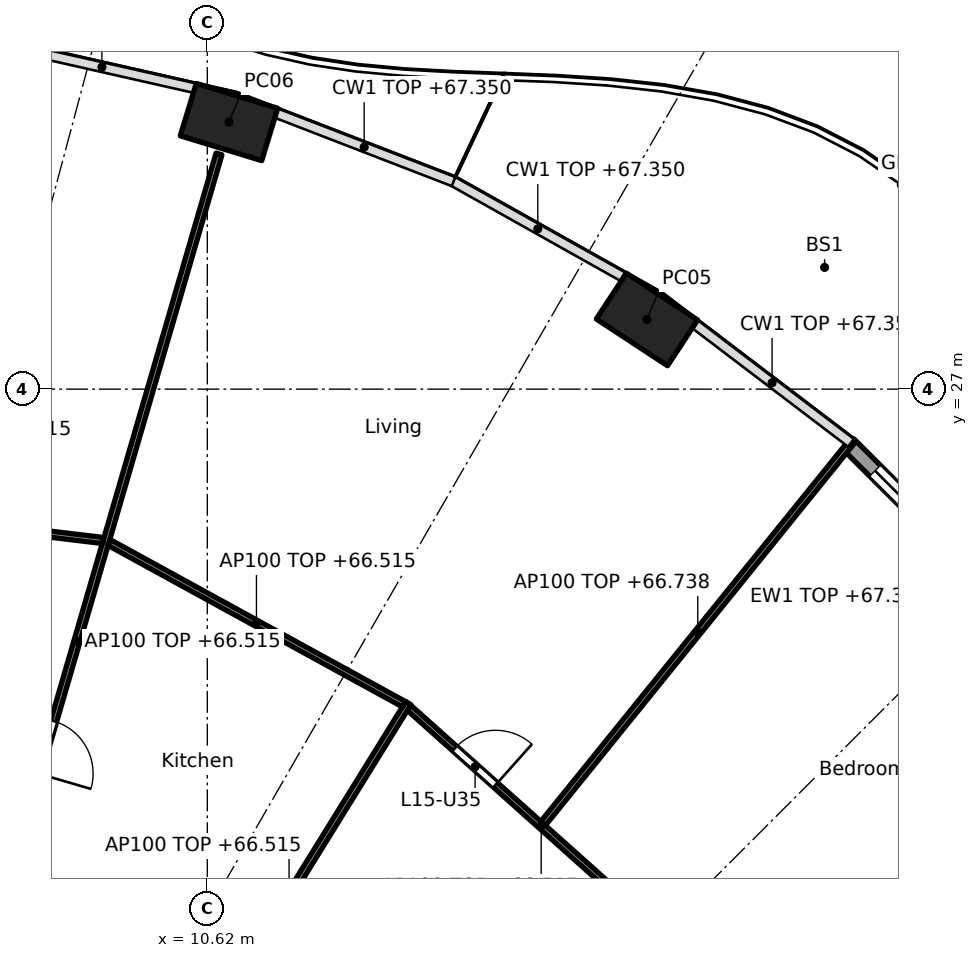
"""IFC4 building model, lengths in metres.
Left out: names, types, materials, properties, quantities, classifications, styles, units other than length and angle.
Written with IfcOpenShell. Run it as: python <this file> out.ifc"""

import sys

from ifc_helpers import new_model, si_unit, direction, frame, frame_2d, origin, origin_2d, place, context, subcontext, project, spatial, rectangle, hollow_rectangle, extrude, element, fill, save


model = new_model("IFC4")
c1 = context("Model", 3, precision=1e-05, world=origin(), true_north=direction((0.0, 1.0)))
c2 = subcontext(c1, "Body", "Model", "MODEL_VIEW")
j1 = project(units=[si_unit("LENGTHUNIT", "METRE"), si_unit("PLANEANGLEUNIT", "RADIAN")], contexts=[c1])
p1 = place(None, origin())
s1 = spatial("IfcSite", under=j1, at=p1, CompositionType="ELEMENT")
p2 = place(p1, origin())
s2 = spatial("IfcBuilding", under=s1, at=p2, CompositionType="ELEMENT")
p3 = place(p2, frame((0.0, 0.0, 64.0)))
s3 = spatial("IfcBuildingStorey", under=s2, at=p3, CompositionType="ELEMENT", Elevation=64.0)
for number, where, z_axis, x_axis in (
    (1, (17.85, 28.146, 0.0), (0.0, 0.0, 1.0), (-0.836, 0.549, 0.0)),
    (2, (10.976, 31.393, 0.0), (0.0, 0.0, 1.0), (-0.957, 0.292, 0.0)),
):
    element("IfcColumn", number, at=place(p3, frame(where, z_axis=z_axis, x_axis=x_axis)), inside=s3, PredefinedType="COLUMN", context=c2, shape_type="SweptSolid", body=[
        extrude(hollow_rectangle(XDim=1.4, YDim=0.9, WallThickness=0.05, at=origin_2d()), origin(), (0.0, 0.0, 1.0), 3.7),
    ])
p4 = place(p3, frame((21.166, 26.092, 0.0), z_axis=(0.0, 0.0, 1.0), x_axis=(0.707803094595, -0.706409781417, 0.0)))
e3 = element("IfcWall", 3, at=p4, inside=s3, PredefinedType="SOLIDWALL", context=c2, shape_type="SweptSolid", body=[
    extrude(rectangle(XDim=3.329, YDim=0.25, at=frame_2d((1.665, 0.0))), origin(), (0.0, 0.0, 1.0), 3.35),
])
p5 = place(p4, frame((0.615, 0.0, 0.0)))
e4 = element("IfcOpeningElement", 4, at=p5, cuts=e3, PredefinedType="OPENING", context=c2, shape_type="SweptSolid", body=[
    extrude(rectangle(XDim=2.1, YDim=2.4, at=frame_2d((1.05, 1.2))), frame((0.0, 0.135, 0.0), z_axis=(0.0, -1.0, 0.0), x_axis=(1.0, 0.0, 0.0)), (0.0, 0.0, 1.0), 0.27),
])
p6 = place(p3, frame((14.329, 11.221, 0.0), z_axis=(0.0, 0.0, 1.0), x_axis=(0.810671130917, 0.58550176558, 0.0)))
e5 = element("IfcWall", 5, at=p6, inside=s3, PredefinedType="PARTITIONING", context=c2, shape_type="SweptSolid", body=[
    extrude(rectangle(XDim=15.106, YDim=0.1, at=frame_2d((7.553, 0.0))), origin(), (0.0, 0.0, 1.0), 2.738),
])
p7 = place(p6, frame((3.105, 0.0, 0.0)))
e6 = element("IfcOpeningElement", 6, at=p7, cuts=e5, PredefinedType="OPENING", context=c2, shape_type="SweptSolid", body=[
    extrude(rectangle(XDim=0.9, YDim=2.1, at=frame_2d((0.45, 1.05))), frame((0.0, 0.06, 0.0), z_axis=(0.0, -1.0, 0.0), x_axis=(1.0, 0.0, 0.0)), (0.0, 0.0, 1.0), 0.12),
])
p8 = place(p3, frame((18.285, 17.877, 0.0), z_axis=(0.0, 0.0, 1.0), x_axis=(-0.745806142791, 0.666163041136, 0.0)))
e7 = element("IfcWall", 7, at=p8, inside=s3, PredefinedType="PARTITIONING", context=c2, shape_type="SweptSolid", body=[
    extrude(rectangle(XDim=5.831, YDim=0.1, at=frame_2d((2.915, 0.0))), origin(), (0.0, 0.0, 1.0), 2.515),
])
p9 = place(p8, frame((3.923, 0.0, 0.0)))
e8 = element("IfcOpeningElement", 8, at=p9, cuts=e7, PredefinedType="OPENING", context=c2, shape_type="SweptSolid", body=[
    extrude(rectangle(XDim=0.9, YDim=2.1, at=frame_2d((0.45, 1.05))), frame((0.0, 0.06, 0.0), z_axis=(0.0, -1.0, 0.0), x_axis=(1.0, 0.0, 0.0)), (0.0, 0.0, 1.0), 0.12),
])
p10 = place(p3, frame((16.142, 19.858, 0.0), z_axis=(0.0, 0.0, 1.0), x_axis=(0.628738066508, 0.777617157555, 0.0)))
e9 = element("IfcWall", 9, at=p10, inside=s3, PredefinedType="PARTITIONING", context=c2, shape_type="SweptSolid", body=[
    extrude(rectangle(XDim=8.091, YDim=0.1, at=frame_2d((4.045, 0.0))), origin(), (0.0, 0.0, 1.0), 2.738),
])
p11 = place(p3, frame((10.003, 15.503, 0.0), z_axis=(0.0, 0.0, 1.0), x_axis=(0.52645953022, 0.850200189979, 0.0)))
e10 = element("IfcWall", 10, at=p11, inside=s3, PredefinedType="PARTITIONING", context=c2, shape_type="SweptSolid", body=[
    extrude(rectangle(XDim=7.45, YDim=0.1, at=frame_2d((3.725, 0.0))), origin(), (0.0, 0.0, 1.0), 2.515),
])
p12 = place(p3, frame((13.855, 21.818, 0.0), z_axis=(0.0, 0.0, 1.0), x_axis=(-0.876794415294, 0.480865421203, 0.0)))
e11 = element("IfcWall", 11, at=p12, inside=s3, PredefinedType="PARTITIONING", context=c2, shape_type="SweptSolid", body=[
    extrude(rectangle(XDim=5.536, YDim=0.1, at=frame_2d((2.768, 0.0))), origin(), (0.0, 0.0, 1.0), 2.515),
])
p13 = place(p3, frame((6.137, 14.83, 0.0), z_axis=(0.0, 0.0, 1.0), x_axis=(0.27985745069, 0.960041565399, 0.0)))
e12 = element("IfcWall", 12, at=p13, inside=s3, PredefinedType="PARTITIONING", context=c2, shape_type="SweptSolid", body=[
    extrude(rectangle(XDim=16.705, YDim=0.1, at=frame_2d((8.353, 0.0))), origin(), (0.0, 0.0, 1.0), 2.515),
])
p14 = place(p13, frame((1.334, 0.0, 0.0)))
e13 = element("IfcOpeningElement", 13, at=p14, cuts=e12, PredefinedType="OPENING", context=c2, shape_type="SweptSolid", body=[
    extrude(rectangle(XDim=0.9, YDim=2.1, at=frame_2d((0.45, 1.05))), frame((0.0, 0.06, 0.0), z_axis=(0.0, -1.0, 0.0), x_axis=(1.0, 0.0, 0.0)), (0.0, 0.0, 1.0), 0.12),
])
p15 = place(p13, frame((6.091, 0.0, 0.0)))
e14 = element("IfcOpeningElement", 14, at=p15, cuts=e12, PredefinedType="OPENING", context=c2, shape_type="SweptSolid", body=[
    extrude(rectangle(XDim=0.9, YDim=2.1, at=frame_2d((0.45, 1.05))), frame((0.0, 0.06, 0.0), z_axis=(0.0, -1.0, 0.0), x_axis=(1.0, 0.0, 0.0)), (0.0, 0.0, 1.0), 0.12),
])
p16 = place(p3, frame((8.907, 24.51, 0.0), z_axis=(0.0, 0.0, 1.0), x_axis=(-0.992836798252, 0.119478416615, 0.0)))
e15 = element("IfcWall", 15, at=p16, inside=s3, PredefinedType="PARTITIONING", context=c2, shape_type="SweptSolid", body=[
    extrude(rectangle(XDim=6.01, YDim=0.1, at=frame_2d((3.005, 0.0))), origin(), (0.0, 0.0, 1.0), 2.515),
])
p17 = place(p16, frame((2.555, 0.0, 0.0)))
e16 = element("IfcOpeningElement", 16, at=p17, cuts=e15, PredefinedType="OPENING", context=c2, shape_type="SweptSolid", body=[
    extrude(rectangle(XDim=0.9, YDim=2.1, at=frame_2d((0.45, 1.05))), frame((0.0, 0.06, 0.0), z_axis=(0.0, -1.0, 0.0), x_axis=(1.0, 0.0, 0.0)), (0.0, 0.0, 1.0), 0.12),
])
p18 = place(p5, origin())
e17 = element("IfcDoor", 17, at=p18, inside=s3, OperationType="SLIDING_TO_LEFT", PredefinedType="DOOR", context=c2, shape_type="SweptSolid", body=[
    extrude(rectangle(XDim=2.1, YDim=2.4, at=frame_2d((1.05, 1.2))), frame((0.0, 0.025, 0.0), z_axis=(0.0, -1.0, 0.0), x_axis=(1.0, 0.0, 0.0)), (0.0, 0.0, 1.0), 0.05),
])
fill(e4, e17)
p19 = place(p15, frame((0.9, 0.0, 0.0), x_axis=(-1.0, 0.0, 0.0)))
e18 = element("IfcDoor", 18, at=p19, inside=s3, OperationType="SINGLE_SWING_RIGHT", PredefinedType="DOOR", context=c2, shape_type="SweptSolid", body=[
    extrude(rectangle(XDim=0.9, YDim=2.1, at=frame_2d((0.45, 1.05))), frame((0.0, 0.025, 0.0), z_axis=(0.0, -1.0, 0.0), x_axis=(1.0, 0.0, 0.0)), (0.0, 0.0, 1.0), 0.05),
])
fill(e14, e18)
p20 = place(p9, frame((0.9, 0.0, 0.0), x_axis=(-1.0, 0.0, 0.0)))
e19 = element("IfcDoor", 19, at=p20, inside=s3, OperationType="SINGLE_SWING_RIGHT", PredefinedType="DOOR", context=c2, shape_type="SweptSolid", body=[
    extrude(rectangle(XDim=0.9, YDim=2.1, at=frame_2d((0.45, 1.05))), frame((0.0, 0.025, 0.0), z_axis=(0.0, -1.0, 0.0), x_axis=(1.0, 0.0, 0.0)), (0.0, 0.0, 1.0), 0.05),
])
fill(e8, e19)
save(model, sys.argv[1])
